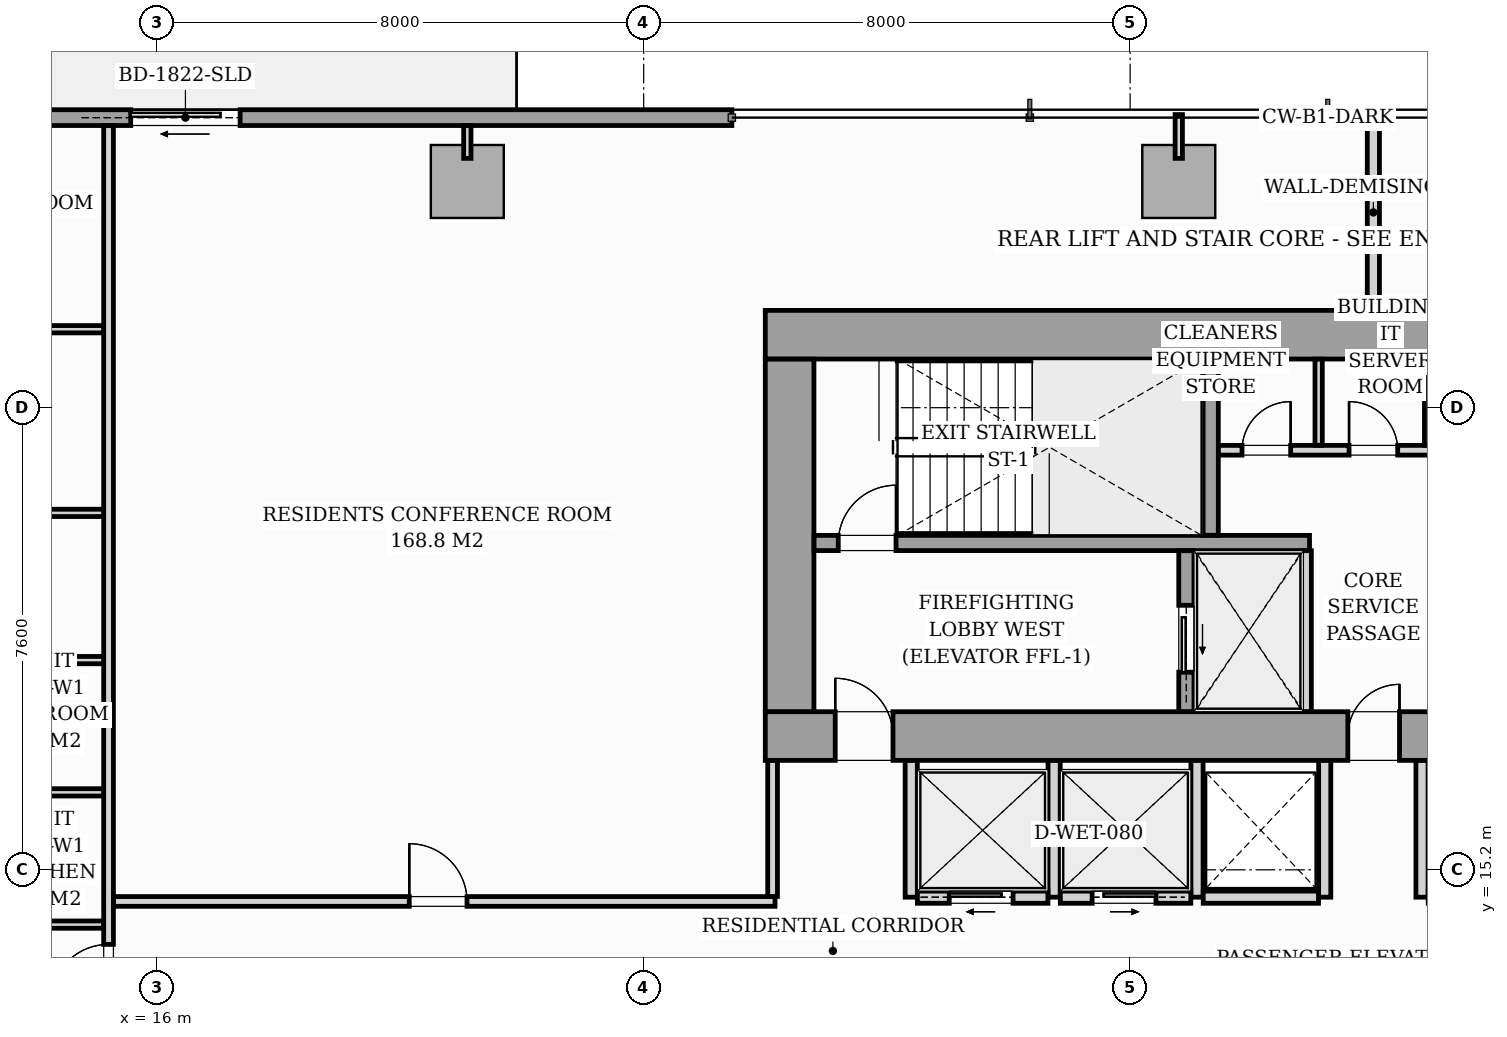
"""IFC4 building model, lengths in metres.
Left out: names, types, materials, properties, quantities, classifications, styles, units other than length and angle.
Written with IfcOpenShell. Run it as: python <this file> out.ifc"""

import sys

from ifc_helpers import new_model, si_unit, direction, frame, frame_2d, origin, origin_2d, place, context, subcontext, project, spatial, rectangle, i_section, extrude, source, transform, mapped, element, fill, save


model = new_model("IFC4")
c1 = context("Model", 3, precision=1e-05, world=origin(), true_north=direction((0.0, 1.0)))
c2 = subcontext(c1, "Body", "Model", "MODEL_VIEW")
j1 = project(units=[si_unit("LENGTHUNIT", "METRE"), si_unit("PLANEANGLEUNIT", "RADIAN")], contexts=[c1])
p1 = place(None, origin())
s1 = spatial("IfcSite", under=j1, at=p1, CompositionType="ELEMENT")
p2 = place(p1, origin())
s2 = spatial("IfcBuilding", under=s1, at=p2, CompositionType="ELEMENT")
p3 = place(p2, frame((0.0, 0.0, 42.2)))
s3 = spatial("IfcBuildingStorey", under=s2, at=p3, CompositionType="ELEMENT", Elevation=42.2)
m1 = source(origin(), c2, "Body", "SweptSolid", [
    extrude(i_section(OverallWidth=0.437, OverallDepth=0.514, WebThickness=0.061, FlangeThickness=0.097, FilletRadius=0.018, at=origin_2d()), origin(), (0.0, 0.0, 1.0), 3.196),
])
for number, where, z_axis, x_axis in (
    (1, (26.4, 17.4, 0.002), (0.0, 0.0, 1.0), (1.0, 0.0, 0.0)),
    (2, (33.12, 17.4, 0.002), (0.0, 0.0, 1.0), (1.0, 0.0, 0.0)),
    (3, (26.4, 24.0, 0.002), (0.0, 0.0, 1.0), (1.0, 0.0, 0.0)),
    (4, (33.12, 24.0, 0.002), (0.0, 0.0, 1.0), (1.0, 0.0, 0.0)),
):
    element("IfcColumn", number, at=place(p3, frame(where, z_axis=z_axis, x_axis=x_axis)), inside=s3, PredefinedType="PILASTER", context=c2, shape_type="MappedRepresentation", body=[
        mapped(m1, transform((0.0, 0.0, 0.0), scale=1.0)),
    ])
m2 = source(origin(), c2, "Body", "SweptSolid", [
    extrude(rectangle(XDim=1.2, YDim=1.2, at=origin_2d()), origin(), (0.0, 0.0, 1.0), 3.196),
])
for number, where, z_axis, x_axis in (
    (5, (21.1, 26.52, 0.002), (0.0, 0.0, 1.0), (1.0, 0.0, 0.0)),
    (6, (32.8, 26.52, 0.002), (0.0, 0.0, 1.0), (1.0, 0.0, 0.0)),
):
    element("IfcColumn", number, at=place(p3, frame(where, z_axis=z_axis, x_axis=x_axis)), inside=s3, PredefinedType="COLUMN", context=c2, shape_type="MappedRepresentation", body=[
        mapped(m2, transform((0.0, 0.0, 0.0), scale=1.0)),
    ])
p4 = place(p3, frame((8.3, 27.57, 0.0), z_axis=(0.0, 0.0, 1.0), x_axis=(1.0, 0.0, 0.0)))
e7 = element("IfcWall", 7, at=p4, inside=s3, PredefinedType="STANDARD", context=c2, shape_type="SweptSolid", body=[
    extrude(rectangle(XDim=17.15, YDim=0.26, at=frame_2d((8.575, 0.0))), origin(), (0.0, 0.0, 1.0), 2.94),
])
p5 = place(p4, frame((7.264, 0.0, 0.0)))
e8 = element("IfcOpeningElement", 8, at=p5, cuts=e7, PredefinedType="OPENING", context=c2, shape_type="SweptSolid", body=[
    extrude(rectangle(XDim=1.8, YDim=2.06, at=frame_2d((0.9, 1.03))), frame((0.0, 0.14, 0.0), z_axis=(0.0, -1.0, 0.0), x_axis=(1.0, 0.0, 0.0)), (0.0, 0.0, 1.0), 0.28),
])
p6 = place(p4, frame((2.05, 0.0, 0.65)))
e9 = element("IfcOpeningElement", 9, at=p6, cuts=e7, PredefinedType="OPENING", context=c2, shape_type="SweptSolid", body=[
    extrude(rectangle(XDim=1.6, YDim=1.5, at=frame_2d((0.8, 0.75))), frame((0.0, 0.14, 0.0), z_axis=(0.0, -1.0, 0.0), x_axis=(1.0, 0.0, 0.0)), (0.0, 0.0, 1.0), 0.28),
])
p7 = place(p3, frame((26.0, 17.4, 0.0), z_axis=(0.0, 0.0, 1.0), x_axis=(1.0, 0.0, 0.0)))
e10 = element("IfcWall", 10, at=p7, inside=s3, PredefinedType="SHEAR", context=c2, shape_type="SweptSolid", body=[
    extrude(rectangle(XDim=20.0, YDim=0.8, at=frame_2d((10.0, 0.0))), origin(), (0.0, 0.0, 1.0), 3.2),
])
p8 = place(p7, frame((1.15, 0.0, 0.0)))
e11 = element("IfcOpeningElement", 11, at=p8, cuts=e10, PredefinedType="OPENING", context=c2, shape_type="SweptSolid", body=[
    extrude(rectangle(XDim=0.95, YDim=2.06, at=frame_2d((0.475, 1.03))), frame((0.0, 0.41, 0.0), z_axis=(0.0, -1.0, 0.0), x_axis=(1.0, 0.0, 0.0)), (0.0, 0.0, 1.0), 0.82),
])
p9 = place(p7, frame((9.58, 0.0, 0.0)))
e12 = element("IfcOpeningElement", 12, at=p9, cuts=e10, PredefinedType="OPENING", context=c2, shape_type="SweptSolid", body=[
    extrude(rectangle(XDim=0.85, YDim=2.0, at=frame_2d((0.425, 1.0))), frame((0.0, 0.41, 0.0), z_axis=(0.0, -1.0, 0.0), x_axis=(1.0, 0.0, 0.0)), (0.0, 0.0, 1.0), 0.82),
])
p10 = place(p7, frame((17.75, 0.0, 0.0)))
e13 = element("IfcOpeningElement", 13, at=p10, cuts=e10, PredefinedType="OPENING", context=c2, shape_type="SweptSolid", body=[
    extrude(rectangle(XDim=0.95, YDim=2.06, at=frame_2d((0.475, 1.03))), frame((0.0, 0.41, 0.0), z_axis=(0.0, -1.0, 0.0), x_axis=(1.0, 0.0, 0.0)), (0.0, 0.0, 1.0), 0.82),
])
p11 = place(p3, frame((26.0, 24.0, 0.0), z_axis=(0.0, 0.0, 1.0), x_axis=(1.0, 0.0, 0.0)))
e14 = element("IfcWall", 14, at=p11, inside=s3, PredefinedType="SHEAR", context=c2, shape_type="SweptSolid", body=[
    extrude(rectangle(XDim=20.0, YDim=0.8, at=frame_2d((10.0, 0.0))), origin(), (0.0, 0.0, 1.0), 3.2),
])
p12 = place(p3, frame((26.4, 17.802, 0.0), z_axis=(0.0, 0.0, 1.0), x_axis=(0.0, 1.0, 0.0)))
e15 = element("IfcWall", 15, at=p12, inside=s3, PredefinedType="SHEAR", context=c2, shape_type="SweptSolid", body=[
    extrude(rectangle(XDim=5.796, YDim=0.8, at=frame_2d((2.898, 0.0))), origin(), (0.0, 0.0, 1.0), 3.2),
])
p13 = place(p3, frame((26.802, 20.575, 0.0), z_axis=(0.0, 0.0, 1.0), x_axis=(1.0, 0.0, 0.0)))
e16 = element("IfcWall", 16, at=p13, inside=s3, PredefinedType="SOLIDWALL", context=c2, shape_type="SweptSolid", body=[
    extrude(rectangle(XDim=8.148, YDim=0.25, at=frame_2d((4.074, 0.0))), origin(), (0.0, 0.0, 1.0), 3.2),
])
p14 = place(p13, frame((0.398, 0.0, 0.0)))
e17 = element("IfcOpeningElement", 17, at=p14, cuts=e16, PredefinedType="OPENING", context=c2, shape_type="SweptSolid", body=[
    extrude(rectangle(XDim=0.95, YDim=2.06, at=frame_2d((0.475, 1.03))), frame((0.0, 0.135, 0.0), z_axis=(0.0, -1.0, 0.0), x_axis=(1.0, 0.0, 0.0)), (0.0, 0.0, 1.0), 0.27),
])
p15 = place(p3, frame((33.325, 20.702, 0.0), z_axis=(0.0, 0.0, 1.0), x_axis=(0.0, 1.0, 0.0)))
e18 = element("IfcWall", 18, at=p15, inside=s3, PredefinedType="SOLIDWALL", context=c2, shape_type="SweptSolid", body=[
    extrude(rectangle(XDim=2.896, YDim=0.25, at=frame_2d((1.448, 0.0))), origin(), (0.0, 0.0, 1.0), 3.2),
])
p16 = place(p3, frame((32.925, 17.802, 0.0), z_axis=(0.0, 0.0, 1.0), x_axis=(0.0, 1.0, 0.0)))
e19 = element("IfcWall", 19, at=p16, inside=s3, PredefinedType="SOLIDWALL", context=c2, shape_type="SweptSolid", body=[
    extrude(rectangle(XDim=2.646, YDim=0.25, at=frame_2d((1.323, 0.0))), origin(), (0.0, 0.0, 1.0), 3.2),
])
p17 = place(p16, frame((0.648, 0.0, 0.0)))
e20 = element("IfcOpeningElement", 20, at=p17, cuts=e19, PredefinedType="OPENING", context=c2, shape_type="SweptSolid", body=[
    extrude(rectangle(XDim=1.1, YDim=2.08, at=frame_2d((0.55, 1.04))), frame((0.0, 0.135, 0.0), z_axis=(0.0, -1.0, 0.0), x_axis=(1.0, 0.0, 0.0)), (0.0, 0.0, 1.0), 0.27),
])
p18 = place(p3, frame((34.9, 17.802, 0.0), z_axis=(0.0, 0.0, 1.0), x_axis=(0.0, 1.0, 0.0)))
e21 = element("IfcWall", 21, at=p18, inside=s3, PredefinedType="PARTITIONING", context=c2, shape_type="SweptSolid", body=[
    extrude(rectangle(XDim=2.646, YDim=0.16, at=frame_2d((1.323, 0.0))), origin(), (0.0, 0.0, 1.0), 2.94),
])
p19 = place(p3, frame((33.452, 22.1, 0.0), z_axis=(0.0, 0.0, 1.0), x_axis=(1.0, 0.0, 0.0)))
e22 = element("IfcWall", 22, at=p19, inside=s3, PredefinedType="PARTITIONING", context=c2, shape_type="SweptSolid", body=[
    extrude(rectangle(XDim=5.096, YDim=0.16, at=frame_2d((2.548, 0.0))), origin(), (0.0, 0.0, 1.0), 2.94),
])
p20 = place(p19, frame((0.388, 0.0, 0.0)))
e23 = element("IfcOpeningElement", 23, at=p20, cuts=e22, PredefinedType="OPENING", context=c2, shape_type="SweptSolid", body=[
    extrude(rectangle(XDim=0.8, YDim=2.05, at=frame_2d((0.4, 1.025))), frame((0.0, 0.09, 0.0), z_axis=(0.0, -1.0, 0.0), x_axis=(1.0, 0.0, 0.0)), (0.0, 0.0, 1.0), 0.18),
])
p21 = place(p19, frame((2.148, 0.0, 0.0)))
e24 = element("IfcOpeningElement", 24, at=p21, cuts=e22, PredefinedType="OPENING", context=c2, shape_type="SweptSolid", body=[
    extrude(rectangle(XDim=0.8, YDim=2.05, at=frame_2d((0.4, 1.025))), frame((0.0, 0.09, 0.0), z_axis=(0.0, -1.0, 0.0), x_axis=(1.0, 0.0, 0.0)), (0.0, 0.0, 1.0), 0.18),
])
p22 = place(p19, frame((3.908, 0.0, 0.0)))
e25 = element("IfcOpeningElement", 25, at=p22, cuts=e22, PredefinedType="OPENING", context=c2, shape_type="SweptSolid", body=[
    extrude(rectangle(XDim=0.8, YDim=2.05, at=frame_2d((0.4, 1.025))), frame((0.0, 0.09, 0.0), z_axis=(0.0, -1.0, 0.0), x_axis=(1.0, 0.0, 0.0)), (0.0, 0.0, 1.0), 0.18),
])
for number, where, z_axis, x_axis in (
    (26, (35.1, 22.182, 0.0), (0.0, 0.0, 1.0), (0.0, 1.0, 0.0)),
    (27, (36.9, 22.182, 0.0), (0.0, 0.0, 1.0), (0.0, 1.0, 0.0)),
):
    element("IfcWall", number, at=place(p3, frame(where, z_axis=z_axis, x_axis=x_axis)), inside=s3, PredefinedType="PARTITIONING", context=c2, shape_type="SweptSolid", body=[
        extrude(rectangle(XDim=1.416, YDim=0.12, at=frame_2d((0.708, 0.0))), origin(), (0.0, 0.0, 1.0), 2.94),
    ])
for number, where, z_axis, x_axis in (
    (28, (28.4, 14.75, 0.0), (0.0, 0.0, 1.0), (0.0, 1.0, 0.0)),
    (29, (30.75, 14.75, 0.0), (0.0, 0.0, 1.0), (0.0, 1.0, 0.0)),
    (30, (33.1, 14.75, 0.0), (0.0, 0.0, 1.0), (0.0, 1.0, 0.0)),
):
    element("IfcWall", number, at=place(p3, frame(where, z_axis=z_axis, x_axis=x_axis)), inside=s3, PredefinedType="PARTITIONING", context=c2, shape_type="SweptSolid", body=[
        extrude(rectangle(XDim=2.248, YDim=0.2, at=frame_2d((1.124, 0.0))), origin(), (0.0, 0.0, 1.0), 2.94),
    ])
p23 = place(p3, frame((28.502, 14.75, 0.0), z_axis=(0.0, 0.0, 1.0), x_axis=(1.0, 0.0, 0.0)))
e31 = element("IfcWall", 31, at=p23, inside=s3, PredefinedType="PARTITIONING", context=c2, shape_type="SweptSolid", body=[
    extrude(rectangle(XDim=2.146, YDim=0.2, at=frame_2d((1.073, 0.0))), origin(), (0.0, 0.0, 1.0), 2.94),
])
p24 = place(p23, frame((0.523, 0.0, 0.0)))
e32 = element("IfcOpeningElement", 32, at=p24, cuts=e31, PredefinedType="OPENING", context=c2, shape_type="SweptSolid", body=[
    extrude(rectangle(XDim=1.05, YDim=2.08, at=frame_2d((0.525, 1.04))), frame((0.0, 0.11, 0.0), z_axis=(0.0, -1.0, 0.0), x_axis=(1.0, 0.0, 0.0)), (0.0, 0.0, 1.0), 0.22),
])
p25 = place(p3, frame((30.852, 14.75, 0.0), z_axis=(0.0, 0.0, 1.0), x_axis=(1.0, 0.0, 0.0)))
e33 = element("IfcWall", 33, at=p25, inside=s3, PredefinedType="PARTITIONING", context=c2, shape_type="SweptSolid", body=[
    extrude(rectangle(XDim=2.146, YDim=0.2, at=frame_2d((1.073, 0.0))), origin(), (0.0, 0.0, 1.0), 2.94),
])
p26 = place(p25, frame((0.523, 0.0, 0.0)))
e34 = element("IfcOpeningElement", 34, at=p26, cuts=e33, PredefinedType="OPENING", context=c2, shape_type="SweptSolid", body=[
    extrude(rectangle(XDim=1.05, YDim=2.08, at=frame_2d((0.525, 1.04))), frame((0.0, 0.11, 0.0), z_axis=(0.0, -1.0, 0.0), x_axis=(1.0, 0.0, 0.0)), (0.0, 0.0, 1.0), 0.22),
])
p27 = place(p3, frame((35.2, 14.75, 0.0), z_axis=(0.0, 0.0, 1.0), x_axis=(0.0, 1.0, 0.0)))
e35 = element("IfcWall", 35, at=p27, inside=s3, PredefinedType="PARTITIONING", context=c2, shape_type="SweptSolid", body=[
    extrude(rectangle(XDim=2.248, YDim=0.2, at=frame_2d((1.124, 0.0))), origin(), (0.0, 0.0, 1.0), 2.94),
])
p28 = place(p3, frame((33.202, 14.75, 0.0), z_axis=(0.0, 0.0, 1.0), x_axis=(1.0, 0.0, 0.0)))
e36 = element("IfcWall", 36, at=p28, inside=s3, PredefinedType="PARTITIONING", context=c2, shape_type="SweptSolid", body=[
    extrude(rectangle(XDim=1.896, YDim=0.2, at=frame_2d((0.948, 0.0))), origin(), (0.0, 0.0, 1.0), 2.94),
])
p29 = place(p3, frame((36.8, 14.75, 0.0), z_axis=(0.0, 0.0, 1.0), x_axis=(0.0, 1.0, 0.0)))
e37 = element("IfcWall", 37, at=p29, inside=s3, PredefinedType="PARTITIONING", context=c2, shape_type="SweptSolid", body=[
    extrude(rectangle(XDim=2.248, YDim=0.2, at=frame_2d((1.124, 0.0))), origin(), (0.0, 0.0, 1.0), 2.94),
])
p30 = place(p3, frame((15.2, 12.712, 0.0), z_axis=(0.0, 0.0, 1.0), x_axis=(0.0, 1.0, 0.0)))
e38 = element("IfcWall", 38, at=p30, inside=s3, PredefinedType="PARTITIONING", context=c2, shape_type="SweptSolid", body=[
    extrude(rectangle(XDim=14.726, YDim=0.16, at=frame_2d((7.363, 0.0))), origin(), (0.0, 0.0, 1.0), 2.94),
])
p31 = place(p30, frame((0.312, 0.0, 0.0)))
e39 = element("IfcOpeningElement", 39, at=p31, cuts=e38, PredefinedType="OPENING", context=c2, shape_type="SweptSolid", body=[
    extrude(rectangle(XDim=0.95, YDim=2.06, at=frame_2d((0.475, 1.03))), frame((0.0, 0.09, 0.0), z_axis=(0.0, -1.0, 0.0), x_axis=(1.0, 0.0, 0.0)), (0.0, 0.0, 1.0), 0.18),
])
p32 = place(p3, frame((36.0, 24.402, 0.0), z_axis=(0.0, 0.0, 1.0), x_axis=(0.0, 1.0, 0.0)))
e40 = element("IfcWall", 40, at=p32, inside=s3, PredefinedType="PARTITIONING", context=c2, shape_type="SweptSolid", body=[
    extrude(rectangle(XDim=3.218, YDim=0.2, at=frame_2d((1.609, 0.0))), origin(), (0.0, 0.0, 1.0), 2.94),
])
for number, where, z_axis, x_axis in (
    (41, (12.862, 16.474, 0.0), (0.0, 0.0, 1.0), (1.0, 0.0, 0.0)),
    (42, (12.862, 14.299, 0.0), (0.0, 0.0, 1.0), (1.0, 0.0, 0.0)),
    (43, (12.862, 18.649, 0.0), (0.0, 0.0, 1.0), (1.0, 0.0, 0.0)),
):
    element("IfcWall", number, at=place(p3, frame(where, z_axis=z_axis, x_axis=x_axis)), inside=s3, PredefinedType="PARTITIONING", context=c2, shape_type="SweptSolid", body=[
        extrude(rectangle(XDim=2.256, YDim=0.12, at=frame_2d((1.128, 0.0))), origin(), (0.0, 0.0, 1.0), 2.94),
    ])
p33 = place(p3, frame((5.88, 24.09, 0.0), z_axis=(0.0, 0.0, 1.0), x_axis=(1.0, 0.0, 0.0)))
e44 = element("IfcWall", 44, at=p33, inside=s3, PredefinedType="PARTITIONING", context=c2, shape_type="SweptSolid", body=[
    extrude(rectangle(XDim=9.238, YDim=0.12, at=frame_2d((4.619, 0.0))), origin(), (0.0, 0.0, 1.0), 2.94),
])
p34 = place(p33, frame((4.185, 0.0, 0.0)))
e45 = element("IfcOpeningElement", 45, at=p34, cuts=e44, PredefinedType="OPENING", context=c2, shape_type="SweptSolid", body=[
    extrude(rectangle(XDim=0.85, YDim=2.05, at=frame_2d((0.425, 1.025))), frame((0.0, 0.07, 0.0), z_axis=(0.0, -1.0, 0.0), x_axis=(1.0, 0.0, 0.0)), (0.0, 0.0, 1.0), 0.14),
])
p35 = place(p3, frame((5.88, 21.07, 0.0), z_axis=(0.0, 0.0, 1.0), x_axis=(1.0, 0.0, 0.0)))
e46 = element("IfcWall", 46, at=p35, inside=s3, PredefinedType="PARTITIONING", context=c2, shape_type="SweptSolid", body=[
    extrude(rectangle(XDim=9.238, YDim=0.12, at=frame_2d((4.619, 0.0))), origin(), (0.0, 0.0, 1.0), 2.94),
])
p36 = place(p35, frame((4.185, 0.0, 0.0)))
e47 = element("IfcOpeningElement", 47, at=p36, cuts=e46, PredefinedType="OPENING", context=c2, shape_type="SweptSolid", body=[
    extrude(rectangle(XDim=0.85, YDim=2.05, at=frame_2d((0.425, 1.025))), frame((0.0, 0.07, 0.0), z_axis=(0.0, -1.0, 0.0), x_axis=(1.0, 0.0, 0.0)), (0.0, 0.0, 1.0), 0.14),
])
p37 = place(p3, frame((15.282, 14.68, 0.0), z_axis=(0.0, 0.0, 1.0), x_axis=(1.0, 0.0, 0.0)))
e48 = element("IfcWall", 48, at=p37, inside=s3, PredefinedType="PARTITIONING", context=c2, shape_type="SweptSolid", body=[
    extrude(rectangle(XDim=10.878, YDim=0.16, at=frame_2d((5.439, 0.0))), origin(), (0.0, 0.0, 1.0), 2.94),
])
p38 = place(p37, frame((4.863, 0.0, 0.0)))
e49 = element("IfcOpeningElement", 49, at=p38, cuts=e48, PredefinedType="OPENING", context=c2, shape_type="SweptSolid", body=[
    extrude(rectangle(XDim=0.95, YDim=2.06, at=frame_2d((0.475, 1.03))), frame((0.0, 0.09, 0.0), z_axis=(0.0, -1.0, 0.0), x_axis=(1.0, 0.0, 0.0)), (0.0, 0.0, 1.0), 0.18),
])
p39 = place(p3, frame((26.12, 14.762, 0.0), z_axis=(0.0, 0.0, 1.0), x_axis=(0.0, 1.0, 0.0)))
e50 = element("IfcWall", 50, at=p39, inside=s3, PredefinedType="PARTITIONING", context=c2, shape_type="SweptSolid", body=[
    extrude(rectangle(XDim=2.236, YDim=0.16, at=frame_2d((1.118, 0.0))), origin(), (0.0, 0.0, 1.0), 2.94),
])
p40 = place(p3, frame((21.1, 26.9, 0.0), z_axis=(0.0, 0.0, 1.0), x_axis=(0.0, 1.0, 0.0)))
e51 = element("IfcWall", 51, at=p40, inside=s3, PredefinedType="PARTITIONING", context=c2, shape_type="SweptSolid", body=[
    extrude(rectangle(XDim=0.538, YDim=0.12, at=frame_2d((0.269, 0.0))), origin(), (0.0, 0.0, 1.0), 2.94),
])
p41 = place(p3, frame((32.8, 26.9, 0.0), z_axis=(0.0, 0.0, 1.0), x_axis=(0.0, 1.0, 0.0)))
e52 = element("IfcWall", 52, at=p41, inside=s3, PredefinedType="PARTITIONING", context=c2, shape_type="SweptSolid", body=[
    extrude(rectangle(XDim=0.72, YDim=0.12, at=frame_2d((0.36, 0.0))), origin(), (0.0, 0.0, 1.0), 2.94),
])
m3 = source(origin(), c2, "Body", "SweptSolid", [
    extrude(rectangle(XDim=1.8, YDim=2.06, at=frame_2d((0.9, 1.03))), frame((0.0, 0.025, 0.0), z_axis=(0.0, -1.0, 0.0), x_axis=(1.0, 0.0, 0.0)), (0.0, 0.0, 1.0), 0.05),
])
p42 = place(p5, origin())
e53 = element("IfcDoor", 53, at=p42, inside=s3, OperationType="SLIDING_TO_LEFT", PredefinedType="DOOR", context=c2, shape_type="MappedRepresentation", body=[
    mapped(m3, transform((0.0, 0.0, 0.0), scale=1.0)),
])
fill(e8, e53)
m4 = source(origin(), c2, "Body", "SweptSolid", [
    extrude(rectangle(XDim=0.95, YDim=2.06, at=frame_2d((0.475, 1.03))), frame((0.0, 0.025, 0.0), z_axis=(0.0, -1.0, 0.0), x_axis=(1.0, 0.0, 0.0)), (0.0, 0.0, 1.0), 0.05),
])
p43 = place(p8, origin())
e54 = element("IfcDoor", 54, at=p43, inside=s3, OperationType="SINGLE_SWING_LEFT", PredefinedType="DOOR", context=c2, shape_type="MappedRepresentation", body=[
    mapped(m4, transform((0.0, 0.0, 0.0), scale=1.0)),
])
fill(e11, e54)
m5 = source(origin(), c2, "Body", "SweptSolid", [
    extrude(rectangle(XDim=0.85, YDim=2.0, at=frame_2d((0.425, 1.0))), frame((0.0, 0.025, 0.0), z_axis=(0.0, -1.0, 0.0), x_axis=(1.0, 0.0, 0.0)), (0.0, 0.0, 1.0), 0.05),
])
p44 = place(p9, origin())
e55 = element("IfcDoor", 55, at=p44, inside=s3, OperationType="SINGLE_SWING_RIGHT", PredefinedType="DOOR", context=c2, shape_type="MappedRepresentation", body=[
    mapped(m5, transform((0.0, 0.0, 0.0), scale=1.0)),
])
fill(e12, e55)
p45 = place(p14, origin())
e56 = element("IfcDoor", 56, at=p45, inside=s3, OperationType="SINGLE_SWING_RIGHT", PredefinedType="DOOR", context=c2, shape_type="MappedRepresentation", body=[
    mapped(m4, transform((0.0, 0.0, 0.0), scale=1.0)),
])
fill(e17, e56)
m6 = source(origin(), c2, "Body", "SweptSolid", [
    extrude(rectangle(XDim=1.1, YDim=2.08, at=frame_2d((0.55, 1.04))), frame((0.0, 0.025, 0.0), z_axis=(0.0, -1.0, 0.0), x_axis=(1.0, 0.0, 0.0)), (0.0, 0.0, 1.0), 0.05),
])
p46 = place(p17, origin())
e57 = element("IfcDoor", 57, at=p46, inside=s3, OperationType="SLIDING_TO_LEFT", PredefinedType="DOOR", context=c2, shape_type="MappedRepresentation", body=[
    mapped(m6, transform((0.0, 0.0, 0.0), scale=1.0)),
])
fill(e20, e57)
m7 = source(origin(), c2, "Body", "SweptSolid", [
    extrude(rectangle(XDim=0.8, YDim=2.05, at=frame_2d((0.4, 1.025))), frame((0.0, 0.025, 0.0), z_axis=(0.0, -1.0, 0.0), x_axis=(1.0, 0.0, 0.0)), (0.0, 0.0, 1.0), 0.05),
])
p47 = place(p20, origin())
e58 = element("IfcDoor", 58, at=p47, inside=s3, OperationType="SINGLE_SWING_RIGHT", PredefinedType="DOOR", context=c2, shape_type="MappedRepresentation", body=[
    mapped(m7, transform((0.0, 0.0, 0.0), scale=1.0)),
])
fill(e23, e58)
p48 = place(p21, origin())
e59 = element("IfcDoor", 59, at=p48, inside=s3, OperationType="SINGLE_SWING_LEFT", PredefinedType="DOOR", context=c2, shape_type="MappedRepresentation", body=[
    mapped(m7, transform((0.0, 0.0, 0.0), scale=1.0)),
])
fill(e24, e59)
m8 = source(origin(), c2, "Body", "SweptSolid", [
    extrude(rectangle(XDim=1.05, YDim=2.08, at=frame_2d((0.525, 1.04))), frame((0.0, 0.025, 0.0), z_axis=(0.0, -1.0, 0.0), x_axis=(1.0, 0.0, 0.0)), (0.0, 0.0, 1.0), 0.05),
])
p49 = place(p24, origin())
e60 = element("IfcDoor", 60, at=p49, inside=s3, OperationType="SLIDING_TO_LEFT", PredefinedType="DOOR", context=c2, shape_type="MappedRepresentation", body=[
    mapped(m8, transform((0.0, 0.0, 0.0), scale=1.0)),
])
fill(e32, e60)
p50 = place(p26, origin())
e61 = element("IfcDoor", 61, at=p50, inside=s3, OperationType="SLIDING_TO_RIGHT", PredefinedType="DOOR", context=c2, shape_type="MappedRepresentation", body=[
    mapped(m8, transform((0.0, 0.0, 0.0), scale=1.0)),
])
fill(e34, e61)
m9 = source(origin(), c2, "Body", "SweptSolid", [
    extrude(rectangle(XDim=0.95, YDim=2.06, at=frame_2d((0.475, 1.03))), frame((0.0, 0.025, 0.0), z_axis=(0.0, -1.0, 0.0), x_axis=(1.0, 0.0, 0.0)), (0.0, 0.0, 1.0), 0.05),
])
p51 = place(p31, origin())
e62 = element("IfcDoor", 62, at=p51, inside=s3, OperationType="SINGLE_SWING_LEFT", PredefinedType="DOOR", context=c2, shape_type="MappedRepresentation", body=[
    mapped(m9, transform((0.0, 0.0, 0.0), scale=1.0)),
])
fill(e39, e62)
p52 = place(p38, origin())
e63 = element("IfcDoor", 63, at=p52, inside=s3, OperationType="SINGLE_SWING_LEFT", PredefinedType="DOOR", context=c2, shape_type="MappedRepresentation", body=[
    mapped(m9, transform((0.0, 0.0, 0.0), scale=1.0)),
])
fill(e49, e63)
save(model, sys.argv[1])
